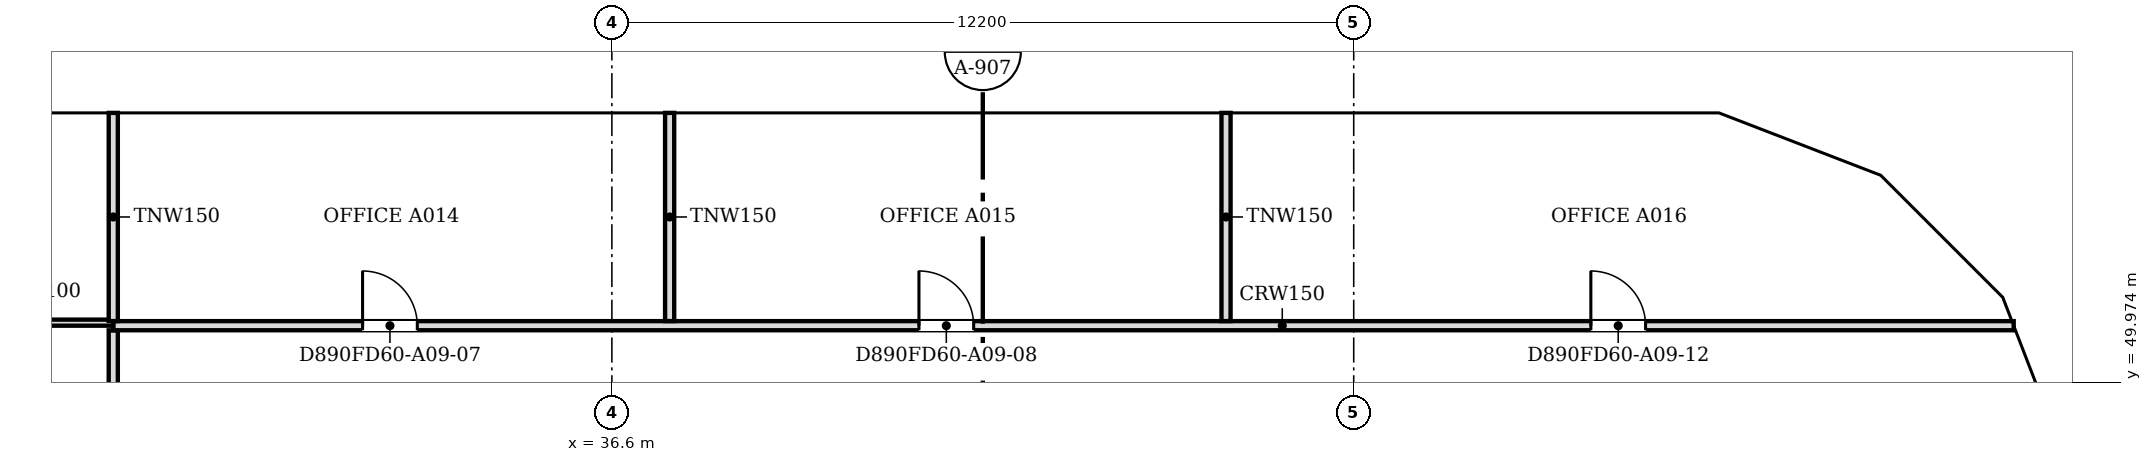
"""IFC4 building model, lengths in metres.
Left out: names, types, materials, properties, quantities, classifications, styles, units other than length and angle.
Written with IfcOpenShell. Run it as: python <this file> out.ifc"""

import sys

from ifc_helpers import new_model, si_unit, direction, frame, frame_2d, origin, place, context, subcontext, project, spatial, polyline, rectangle, outline, extrude, faceted_brep, source, transform, mapped, element, fill, save


model = new_model("IFC4")
c1 = context("Model", 3, precision=1e-05, world=origin(), true_north=direction((0.0, 1.0)))
c2 = subcontext(c1, "Body", "Model", "MODEL_VIEW")
j1 = project(units=[si_unit("LENGTHUNIT", "METRE"), si_unit("PLANEANGLEUNIT", "RADIAN")], contexts=[c1])
p1 = place(None, origin())
s1 = spatial("IfcSite", under=j1, at=p1, CompositionType="ELEMENT")
p2 = place(p1, origin())
s2 = spatial("IfcBuilding", under=s1, at=p2, CompositionType="ELEMENT")
p3 = place(p2, frame((0.0, 0.0, 99.0)))
s3 = spatial("IfcBuildingStorey", under=s2, at=p3, CompositionType="ELEMENT", Elevation=99.0)
m1 = source(origin(), c2, "Body", "Brep", [
    faceted_brep([(2.95, -0.25, 0.0), (3.003, -0.25, 0.068), (3.003, -0.25, 7.532), (2.95, -0.25, 7.6), (0.0, -0.25, 3.8), (0.047, 0.25, 3.86), (2.898, 0.25, 7.532), (2.898, 0.25, 0.068), (0.047, 0.25, 3.74), (2.95, 0.0, 0.0), (2.95, 0.0, 7.6), (0.0, 0.0, 3.8)], [[[0, 1, 2, 3, 4]], [[5, 6, 7, 8]], [[1, 0, 9]], [[10, 3, 2]], [[6, 5, 11, 4, 3, 10]], [[8, 7, 9, 0, 4, 11]], [[8, 11, 5]], [[1, 9, 7, 6, 10, 2]]]),
])
p4 = place(p3, frame((60.75, 48.753, -3.8), z_axis=(0.0, 0.0, 1.0), x_axis=(-0.35992665181, 0.932980602862, 0.0)))
e1 = element("IfcWall", 1, at=p4, inside=s3, PredefinedType="SOLIDWALL", context=c2, shape_type="MappedRepresentation", body=[
    mapped(m1, transform((0.0, 0.0, 0.0), scale=1.0)),
])
m2 = source(origin(), c2, "Body", "SweptSolid", [
    extrude(outline(polyline([(2.75, 6.935), (0.316, 3.8), (2.75, 0.665), (2.75, 6.935)])), frame((0.0, 0.26, 0.0), z_axis=(0.0, -1.0, 0.0), x_axis=(1.0, 0.0, 0.0)), (0.0, 0.0, 1.0), 0.52),
])
p5 = place(p4, origin())
e2 = element("IfcOpeningElement", 2, at=p5, cuts=e1, PredefinedType="OPENING", context=c2, shape_type="MappedRepresentation", body=[
    mapped(m2, transform((0.0, 0.0, 0.0), scale=1.0)),
])
m3 = source(origin(), c2, "Body", "Brep", [
    faceted_brep([(0.053, -0.25, 0.0), (2.997, -0.25, 3.8), (0.053, -0.25, 7.6), (0.0, -0.25, 7.532), (0.0, -0.25, 0.068), (0.106, 0.25, 7.532), (2.944, 0.25, 3.868), (2.944, 0.25, 3.732), (0.106, 0.25, 0.068), (2.997, 0.0, 3.8), (0.053, 0.0, 0.0), (0.053, 0.0, 7.6)], [[[0, 1, 2, 3, 4]], [[5, 6, 7, 8]], [[8, 7, 9, 1, 0, 10]], [[6, 5, 11, 2, 1, 9]], [[3, 2, 11]], [[10, 0, 4]], [[8, 10, 4, 3, 11, 5]], [[9, 7, 6]]]),
])
p6 = place(p3, frame((59.726, 51.469, -3.8), z_axis=(0.0, 0.0, 1.0), x_axis=(-0.707106781187, 0.707106781187, 0.0)))
e3 = element("IfcWall", 3, at=p6, inside=s3, PredefinedType="SOLIDWALL", context=c2, shape_type="MappedRepresentation", body=[
    mapped(m3, transform((0.0, 0.0, 0.0), scale=1.0)),
])
m4 = source(origin(), c2, "Body", "SweptSolid", [
    extrude(outline(polyline([(0.253, 0.666), (2.681, 3.8), (0.253, 6.934), (0.253, 0.666)])), frame((0.0, 0.26, 0.0), z_axis=(0.0, -1.0, 0.0), x_axis=(1.0, 0.0, 0.0)), (0.0, 0.0, 1.0), 0.52),
])
p7 = place(p6, origin())
e4 = element("IfcOpeningElement", 4, at=p7, cuts=e3, PredefinedType="OPENING", context=c2, shape_type="MappedRepresentation", body=[
    mapped(m4, transform((0.0, 0.0, 0.0), scale=1.0)),
])
m5 = source(origin(), c2, "Body", "Brep", [
    faceted_brep([(2.95, -0.25, 0.0), (2.997, -0.25, 0.059), (2.997, -0.25, 7.541), (2.95, -0.25, 7.6), (0.0, -0.25, 3.8), (0.053, 0.25, 3.868), (2.904, 0.25, 7.54), (2.904, 0.25, 0.06), (0.053, 0.25, 3.732), (2.95, 0.0, 0.0), (2.95, 0.0, 7.6), (0.0, 0.0, 3.8)], [[[0, 1, 2, 3, 4]], [[5, 6, 7, 8]], [[1, 0, 9]], [[10, 3, 2]], [[6, 5, 11, 4, 3, 10]], [[8, 7, 9, 0, 4, 11]], [[8, 11, 5]], [[1, 9, 7, 6, 10, 2]]]),
])
p8 = place(p3, frame((57.606, 53.588, -3.8), z_axis=(0.0, 0.0, 1.0), x_axis=(-0.932990326376, 0.359901446078, 0.0)))
e5 = element("IfcWall", 5, at=p8, inside=s3, PredefinedType="SOLIDWALL", context=c2, shape_type="MappedRepresentation", body=[
    mapped(m5, transform((0.0, 0.0, 0.0), scale=1.0)),
])
p9 = place(p8, origin())
e6 = element("IfcOpeningElement", 6, at=p9, cuts=e5, PredefinedType="OPENING", context=c2, shape_type="MappedRepresentation", body=[
    mapped(m2, transform((0.0, 0.0, 0.0), scale=1.0)),
])
m6 = source(origin(), c2, "Body", "Brep", [
    faceted_brep([(0.047, -0.25, 0.0), (3.05, -0.25, 3.8), (0.047, -0.25, 7.6), (0.0, -0.25, 7.54), (0.0, -0.25, 0.06), (0.093, 0.25, 7.541), (3.05, 0.25, 3.8), (0.093, 0.25, 0.059), (0.047, 0.0, 0.0), (0.047, 0.0, 7.6)], [[[0, 1, 2, 3, 4]], [[5, 6, 7]], [[7, 6, 1, 0, 8]], [[6, 5, 9, 2, 1]], [[3, 2, 9]], [[8, 0, 4]], [[7, 8, 4, 3, 9, 5]]]),
])
p10 = place(p3, frame((54.9, 54.65, -3.8), z_axis=(0.0, 0.0, 1.0), x_axis=(-1.0, 0.0, 0.0)))
e7 = element("IfcWall", 7, at=p10, inside=s3, PredefinedType="SOLIDWALL", context=c2, shape_type="MappedRepresentation", body=[
    mapped(m6, transform((0.0, 0.0, 0.0), scale=1.0)),
])
m7 = source(origin(), c2, "Body", "SweptSolid", [
    extrude(outline(polyline([(0.247, 0.656), (2.731, 3.8), (0.247, 6.944), (0.247, 0.656)])), frame((0.0, 0.26, 0.0), z_axis=(0.0, -1.0, 0.0), x_axis=(1.0, 0.0, 0.0)), (0.0, 0.0, 1.0), 0.52),
])
p11 = place(p10, origin())
e8 = element("IfcOpeningElement", 8, at=p11, cuts=e7, PredefinedType="OPENING", context=c2, shape_type="MappedRepresentation", body=[
    mapped(m7, transform((0.0, 0.0, 0.0), scale=1.0)),
])
m8 = source(origin(), c2, "Body", "SweptSolid", [
    extrude(outline(polyline([(3.05, 0.0), (6.1, 3.8), (3.05, 7.6), (0.0, 3.8), (3.05, 0.0)])), frame((0.0, 0.25, 0.0), z_axis=(0.0, -1.0, 0.0), x_axis=(1.0, 0.0, 0.0)), (0.0, 0.0, 1.0), 0.5),
])
p12 = place(p3, frame((51.85, 54.65, -3.8), z_axis=(0.0, 0.0, 1.0), x_axis=(-1.0, 0.0, 0.0)))
e9 = element("IfcWall", 9, at=p12, inside=s3, PredefinedType="SOLIDWALL", context=c2, shape_type="MappedRepresentation", body=[
    mapped(m8, transform((0.0, 0.0, 0.0), scale=1.0)),
])
m9 = source(origin(), c2, "Body", "SweptSolid", [
    extrude(outline(polyline([(3.05, 0.399), (5.78, 3.8), (3.05, 7.201), (0.321, 3.8), (3.05, 0.399)])), frame((0.0, 0.26, 0.0), z_axis=(0.0, -1.0, 0.0), x_axis=(1.0, 0.0, 0.0)), (0.0, 0.0, 1.0), 0.52),
])
p13 = place(p12, origin())
e10 = element("IfcOpeningElement", 10, at=p13, cuts=e9, PredefinedType="OPENING", context=c2, shape_type="MappedRepresentation", body=[
    mapped(m9, transform((0.0, 0.0, 0.0), scale=1.0)),
])
p14 = place(p3, frame((45.75, 54.65, -3.8), z_axis=(0.0, 0.0, 1.0), x_axis=(-1.0, 0.0, 0.0)))
e11 = element("IfcWall", 11, at=p14, inside=s3, PredefinedType="SOLIDWALL", context=c2, shape_type="MappedRepresentation", body=[
    mapped(m8, transform((0.0, 0.0, 0.0), scale=1.0)),
])
p15 = place(p14, origin())
e12 = element("IfcOpeningElement", 12, at=p15, cuts=e11, PredefinedType="OPENING", context=c2, shape_type="MappedRepresentation", body=[
    mapped(m9, transform((0.0, 0.0, 0.0), scale=1.0)),
])
m10 = source(origin(), c2, "Body", "Brep", [
    faceted_brep([(3.05, -0.25, 0.0), (6.1, -0.25, 3.8), (6.1, -0.25, 3.8), (3.05, -0.25, 7.6), (0.0, -0.25, 3.8), (0.0, 0.25, 3.8), (3.05, 0.25, 7.6), (6.1, 0.25, 3.8), (6.1, 0.25, 3.8), (3.05, 0.25, 0.0)], [[[0, 1, 2, 3, 4]], [[5, 6, 7, 8, 9]], [[9, 8, 1, 0]], [[7, 6, 3, 2]], [[6, 5, 4, 3]], [[5, 9, 0, 4]], [[1, 8, 7, 2]]]),
])
p16 = place(p3, frame((39.65, 54.65, -3.8), z_axis=(0.0, 0.0, 1.0), x_axis=(-1.0, 0.0, 0.0)))
e13 = element("IfcWall", 13, at=p16, inside=s3, PredefinedType="SOLIDWALL", context=c2, shape_type="MappedRepresentation", body=[
    mapped(m10, transform((0.0, 0.0, 0.0), scale=1.0)),
])
p17 = place(p16, origin())
e14 = element("IfcOpeningElement", 14, at=p17, cuts=e13, PredefinedType="OPENING", context=c2, shape_type="MappedRepresentation", body=[
    mapped(m9, transform((0.0, 0.0, 0.0), scale=1.0)),
])
p18 = place(p3, frame((33.55, 54.65, -3.8), z_axis=(0.0, 0.0, 1.0), x_axis=(-1.0, 0.0, 0.0)))
e15 = element("IfcWall", 15, at=p18, inside=s3, PredefinedType="SOLIDWALL", context=c2, shape_type="MappedRepresentation", body=[
    mapped(m8, transform((0.0, 0.0, 0.0), scale=1.0)),
])
p19 = place(p18, origin())
e16 = element("IfcOpeningElement", 16, at=p19, cuts=e15, PredefinedType="OPENING", context=c2, shape_type="MappedRepresentation", body=[
    mapped(m9, transform((0.0, 0.0, 0.0), scale=1.0)),
])
p20 = place(p3, frame((27.45, 54.65, -3.8), z_axis=(0.0, 0.0, 1.0), x_axis=(-1.0, 0.0, 0.0)))
e17 = element("IfcWall", 17, at=p20, inside=s3, PredefinedType="SOLIDWALL", context=c2, shape_type="MappedRepresentation", body=[
    mapped(m10, transform((0.0, 0.0, 0.0), scale=1.0)),
])
p21 = place(p20, origin())
e18 = element("IfcOpeningElement", 18, at=p21, cuts=e17, PredefinedType="OPENING", context=c2, shape_type="MappedRepresentation", body=[
    mapped(m9, transform((0.0, 0.0, 0.0), scale=1.0)),
])
p22 = place(p2, frame((0.0, 0.0, 102.8)))
s4 = spatial("IfcBuildingStorey", under=s2, at=p22, CompositionType="ELEMENT", Elevation=102.8)
m11 = source(origin(), c2, "Body", "Brep", [
    faceted_brep([(0.047, -0.25, 0.0), (2.997, -0.25, 3.8), (0.047, -0.25, 7.6), (0.0, -0.25, 7.541), (0.0, -0.25, 0.059), (0.093, 0.25, 7.54), (2.944, 0.25, 3.868), (2.944, 0.25, 3.732), (0.093, 0.25, 0.06), (2.997, 0.0, 3.8), (0.047, 0.0, 0.0), (0.047, 0.0, 7.6)], [[[0, 1, 2, 3, 4]], [[5, 6, 7, 8]], [[8, 7, 9, 1, 0, 10]], [[6, 5, 11, 2, 1, 9]], [[3, 2, 11]], [[10, 0, 4]], [[8, 10, 4, 3, 11, 5]], [[9, 7, 6]]]),
])
p23 = place(p22, frame((60.767, 48.71, -3.8), z_axis=(0.0, 0.0, 1.0), x_axis=(-0.359901446078, 0.932990326376, 0.0)))
e19 = element("IfcWall", 19, at=p23, inside=s4, PredefinedType="SOLIDWALL", context=c2, shape_type="MappedRepresentation", body=[
    mapped(m11, transform((0.0, 0.0, 0.0), scale=1.0)),
])
m12 = source(origin(), c2, "Body", "SweptSolid", [
    extrude(outline(polyline([(0.247, 0.665), (2.681, 3.8), (0.247, 6.935), (0.247, 0.665)])), frame((0.0, 0.26, 0.0), z_axis=(0.0, -1.0, 0.0), x_axis=(1.0, 0.0, 0.0)), (0.0, 0.0, 1.0), 0.52),
])
p24 = place(p23, origin())
e20 = element("IfcOpeningElement", 20, at=p24, cuts=e19, PredefinedType="OPENING", context=c2, shape_type="MappedRepresentation", body=[
    mapped(m12, transform((0.0, 0.0, 0.0), scale=1.0)),
])
m13 = source(origin(), c2, "Body", "Brep", [
    faceted_brep([(2.944, -0.25, 0.0), (2.997, -0.25, 0.068), (2.997, -0.25, 7.532), (2.944, -0.25, 7.6), (0.0, -0.25, 3.8), (0.053, 0.25, 3.868), (2.891, 0.25, 7.532), (2.891, 0.25, 0.068), (0.053, 0.25, 3.732), (2.944, 0.0, 0.0), (2.944, 0.0, 7.6), (0.0, 0.0, 3.8)], [[[0, 1, 2, 3, 4]], [[5, 6, 7, 8]], [[1, 0, 9]], [[10, 3, 2]], [[6, 5, 11, 4, 3, 10]], [[8, 7, 9, 0, 4, 11]], [[8, 11, 5]], [[1, 9, 7, 6, 10, 2]]]),
])
p25 = place(p22, frame((59.688, 51.506, -3.8), z_axis=(0.0, 0.0, 1.0), x_axis=(-0.707106781187, 0.707106781187, 0.0)))
e21 = element("IfcWall", 21, at=p25, inside=s4, PredefinedType="SOLIDWALL", context=c2, shape_type="MappedRepresentation", body=[
    mapped(m13, transform((0.0, 0.0, 0.0), scale=1.0)),
])
m14 = source(origin(), c2, "Body", "SweptSolid", [
    extrude(outline(polyline([(2.744, 6.934), (0.316, 3.8), (2.744, 0.666), (2.744, 6.934)])), frame((0.0, 0.26, 0.0), z_axis=(0.0, -1.0, 0.0), x_axis=(1.0, 0.0, 0.0)), (0.0, 0.0, 1.0), 0.52),
])
p26 = place(p25, origin())
e22 = element("IfcOpeningElement", 22, at=p26, cuts=e21, PredefinedType="OPENING", context=c2, shape_type="MappedRepresentation", body=[
    mapped(m14, transform((0.0, 0.0, 0.0), scale=1.0)),
])
m15 = source(origin(), c2, "Body", "Brep", [
    faceted_brep([(0.053, -0.25, 0.0), (3.003, -0.25, 3.8), (0.053, -0.25, 7.6), (0.0, -0.25, 7.532), (0.0, -0.25, 0.068), (0.106, 0.25, 7.532), (2.957, 0.25, 3.86), (2.957, 0.25, 3.74), (0.106, 0.25, 0.068), (3.003, 0.0, 3.8), (0.053, 0.0, 0.0), (0.053, 0.0, 7.6)], [[[0, 1, 2, 3, 4]], [[5, 6, 7, 8]], [[8, 7, 9, 1, 0, 10]], [[6, 5, 11, 2, 1, 9]], [[3, 2, 11]], [[10, 0, 4]], [[8, 10, 4, 3, 11, 5]], [[9, 7, 6]]]),
])
p27 = place(p22, frame((57.656, 53.569, -3.8), z_axis=(0.0, 0.0, 1.0), x_axis=(-0.933007896601, 0.359855894603, 0.0)))
e23 = element("IfcWall", 23, at=p27, inside=s4, PredefinedType="SOLIDWALL", context=c2, shape_type="MappedRepresentation", body=[
    mapped(m15, transform((0.0, 0.0, 0.0), scale=1.0)),
])
m16 = source(origin(), c2, "Body", "SweptSolid", [
    extrude(outline(polyline([(0.253, 0.665), (2.687, 3.8), (0.253, 6.935), (0.253, 0.665)])), frame((0.0, 0.26, 0.0), z_axis=(0.0, -1.0, 0.0), x_axis=(1.0, 0.0, 0.0)), (0.0, 0.0, 1.0), 0.52),
])
p28 = place(p27, origin())
e24 = element("IfcOpeningElement", 24, at=p28, cuts=e23, PredefinedType="OPENING", context=c2, shape_type="MappedRepresentation", body=[
    mapped(m16, transform((0.0, 0.0, 0.0), scale=1.0)),
])
m17 = source(origin(), c2, "Body", "Brep", [
    faceted_brep([(3.003, -0.25, 0.0), (6.053, -0.25, 3.8), (3.003, -0.25, 7.6), (0.0, -0.25, 3.8), (0.047, 0.25, 3.859), (3.003, 0.25, 7.6), (6.053, 0.25, 3.8), (3.003, 0.25, 0.0), (0.047, 0.25, 3.741), (0.0, 0.0, 3.8)], [[[0, 1, 2, 3]], [[4, 5, 6, 7, 8]], [[7, 6, 1, 0]], [[6, 5, 2, 1]], [[5, 4, 9, 3, 2]], [[8, 7, 0, 3, 9]], [[8, 9, 4]]]),
])
p29 = place(p22, frame((54.854, 54.65, -3.8), z_axis=(0.0, 0.0, 1.0), x_axis=(-1.0, 0.0, 0.0)))
e25 = element("IfcWall", 25, at=p29, inside=s4, PredefinedType="SOLIDWALL", context=c2, shape_type="MappedRepresentation", body=[
    mapped(m17, transform((0.0, 0.0, 0.0), scale=1.0)),
])
m18 = source(origin(), c2, "Body", "SweptSolid", [
    extrude(outline(polyline([(3.005, 0.401), (5.733, 3.8), (3.005, 7.199), (0.319, 3.8), (3.005, 0.401)])), frame((0.0, 0.26, 0.0), z_axis=(0.0, -1.0, 0.0), x_axis=(1.0, 0.0, 0.0)), (0.0, 0.0, 1.0), 0.52),
])
p30 = place(p29, origin())
e26 = element("IfcOpeningElement", 26, at=p30, cuts=e25, PredefinedType="OPENING", context=c2, shape_type="MappedRepresentation", body=[
    mapped(m18, transform((0.0, 0.0, 0.0), scale=1.0)),
])
p31 = place(p22, frame((48.8, 54.65, -3.8), z_axis=(0.0, 0.0, 1.0), x_axis=(-1.0, 0.0, 0.0)))
e27 = element("IfcWall", 27, at=p31, inside=s4, PredefinedType="SOLIDWALL", context=c2, shape_type="MappedRepresentation", body=[
    mapped(m8, transform((0.0, 0.0, 0.0), scale=1.0)),
])
p32 = place(p31, origin())
e28 = element("IfcOpeningElement", 28, at=p32, cuts=e27, PredefinedType="OPENING", context=c2, shape_type="MappedRepresentation", body=[
    mapped(m9, transform((0.0, 0.0, 0.0), scale=1.0)),
])
p33 = place(p22, frame((42.7, 54.65, -3.8), z_axis=(0.0, 0.0, 1.0), x_axis=(-1.0, 0.0, 0.0)))
e29 = element("IfcWall", 29, at=p33, inside=s4, PredefinedType="SOLIDWALL", context=c2, shape_type="MappedRepresentation", body=[
    mapped(m10, transform((0.0, 0.0, 0.0), scale=1.0)),
])
p34 = place(p33, origin())
e30 = element("IfcOpeningElement", 30, at=p34, cuts=e29, PredefinedType="OPENING", context=c2, shape_type="MappedRepresentation", body=[
    mapped(m9, transform((0.0, 0.0, 0.0), scale=1.0)),
])
p35 = place(p22, frame((36.6, 54.65, -3.8), z_axis=(0.0, 0.0, 1.0), x_axis=(-1.0, 0.0, 0.0)))
e31 = element("IfcWall", 31, at=p35, inside=s4, PredefinedType="SOLIDWALL", context=c2, shape_type="MappedRepresentation", body=[
    mapped(m8, transform((0.0, 0.0, 0.0), scale=1.0)),
])
p36 = place(p35, origin())
e32 = element("IfcOpeningElement", 32, at=p36, cuts=e31, PredefinedType="OPENING", context=c2, shape_type="MappedRepresentation", body=[
    mapped(m9, transform((0.0, 0.0, 0.0), scale=1.0)),
])
p37 = place(p22, frame((30.5, 54.65, -3.8), z_axis=(0.0, 0.0, 1.0), x_axis=(-1.0, 0.0, 0.0)))
e33 = element("IfcWall", 33, at=p37, inside=s4, PredefinedType="SOLIDWALL", context=c2, shape_type="MappedRepresentation", body=[
    mapped(m8, transform((0.0, 0.0, 0.0), scale=1.0)),
])
p38 = place(p37, origin())
e34 = element("IfcOpeningElement", 34, at=p38, cuts=e33, PredefinedType="OPENING", context=c2, shape_type="MappedRepresentation", body=[
    mapped(m9, transform((0.0, 0.0, 0.0), scale=1.0)),
])
p39 = place(p3, frame((28.4, 48.176, 0.0), z_axis=(0.0, 0.0, 1.0), x_axis=(0.0, 1.0, 0.0)))
e35 = element("IfcWall", 35, at=p39, inside=s3, PredefinedType="PARTITIONING", context=c2, shape_type="SweptSolid", body=[
    extrude(rectangle(XDim=2.648, YDim=0.15, at=frame_2d((1.324, 0.0))), origin(), (0.0, 0.0, 1.0), 3.067),
])
p40 = place(p3, frame((28.4, 50.9, 0.0), z_axis=(0.0, 0.0, 1.0), x_axis=(1.0, 0.0, 0.0)))
e36 = element("IfcWall", 36, at=p40, inside=s3, PredefinedType="PARTITIONING", context=c2, shape_type="SweptSolid", body=[
    extrude(rectangle(XDim=31.254, YDim=0.15, at=frame_2d((15.627, 0.0))), origin(), (0.0, 0.0, 1.0), 3.067),
])
m19 = source(origin(), c2, "Body", "SweptSolid", [
    extrude(rectangle(XDim=0.9, YDim=2.1, at=frame_2d((0.45, 1.05))), frame((0.0, 0.085, 0.0), z_axis=(0.0, -1.0, 0.0), x_axis=(1.0, 0.0, 0.0)), (0.0, 0.0, 1.0), 0.17),
])
p41 = place(p40, frame((4.1, 0.0, 0.0)))
e37 = element("IfcOpeningElement", 37, at=p41, cuts=e36, PredefinedType="OPENING", context=c2, shape_type="MappedRepresentation", body=[
    mapped(m19, transform((0.0, 0.0, 0.0), scale=1.0)),
])
p42 = place(p40, frame((13.25, 0.0, 0.0)))
e38 = element("IfcOpeningElement", 38, at=p42, cuts=e36, PredefinedType="OPENING", context=c2, shape_type="MappedRepresentation", body=[
    mapped(m19, transform((0.0, 0.0, 0.0), scale=1.0)),
])
p43 = place(p40, frame((24.3, 0.0, 0.0)))
e39 = element("IfcOpeningElement", 39, at=p43, cuts=e36, PredefinedType="OPENING", context=c2, shape_type="MappedRepresentation", body=[
    mapped(m19, transform((0.0, 0.0, 0.0), scale=1.0)),
])
p44 = place(p3, frame((22.826, 50.95, 0.0), z_axis=(0.0, 0.0, 1.0), x_axis=(1.0, 0.0, 0.0)))
e40 = element("IfcWall", 40, at=p44, inside=s3, PredefinedType="PARTITIONING", context=c2, shape_type="SweptSolid", body=[
    extrude(rectangle(XDim=5.573, YDim=0.1, at=frame_2d((2.787, 0.0))), origin(), (0.0, 0.0, 1.0), 3.067),
])
m20 = source(origin(), c2, "Body", "SweptSolid", [
    extrude(rectangle(XDim=0.9, YDim=2.1, at=frame_2d((0.45, 1.05))), frame((0.0, 0.06, 0.0), z_axis=(0.0, -1.0, 0.0), x_axis=(1.0, 0.0, 0.0)), (0.0, 0.0, 1.0), 0.12),
])
p45 = place(p44, frame((2.3, 0.0, 0.0)))
e41 = element("IfcOpeningElement", 41, at=p45, cuts=e40, PredefinedType="OPENING", context=c2, shape_type="MappedRepresentation", body=[
    mapped(m20, transform((0.0, 0.0, 0.0), scale=1.0)),
])
for number, where, z_axis, x_axis in (
    (42, (28.4, 50.976, 0.0), (0.0, 0.0, 1.0), (0.0, 1.0, 0.0)),
    (43, (37.55, 50.976, 0.0), (0.0, 0.0, 1.0), (0.0, 1.0, 0.0)),
    (44, (46.7, 50.976, 0.0), (0.0, 0.0, 1.0), (0.0, 1.0, 0.0)),
):
    element("IfcWall", number, at=place(p3, frame(where, z_axis=z_axis, x_axis=x_axis)), inside=s3, PredefinedType="PARTITIONING", context=c2, shape_type="SweptSolid", body=[
        extrude(rectangle(XDim=3.424, YDim=0.15, at=frame_2d((1.712, 0.0))), origin(), (0.0, 0.0, 1.0), 3.067),
    ])
m21 = source(origin(), c2, "Body", "SweptSolid", [
    extrude(rectangle(XDim=0.9, YDim=2.1, at=frame_2d((0.45, 1.05))), frame((0.0, 0.025, 0.0), z_axis=(0.0, -1.0, 0.0), x_axis=(1.0, 0.0, 0.0)), (0.0, 0.0, 1.0), 0.05),
])
p46 = place(p41, origin())
e45 = element("IfcDoor", 45, at=p46, inside=s3, OperationType="SINGLE_SWING_LEFT", PredefinedType="DOOR", context=c2, shape_type="MappedRepresentation", body=[
    mapped(m21, transform((0.0, 0.0, 0.0), scale=1.0)),
])
fill(e37, e45)
p47 = place(p42, origin())
e46 = element("IfcDoor", 46, at=p47, inside=s3, OperationType="SINGLE_SWING_LEFT", PredefinedType="DOOR", context=c2, shape_type="MappedRepresentation", body=[
    mapped(m21, transform((0.0, 0.0, 0.0), scale=1.0)),
])
fill(e38, e46)
p48 = place(p43, origin())
e47 = element("IfcDoor", 47, at=p48, inside=s3, OperationType="SINGLE_SWING_LEFT", PredefinedType="DOOR", context=c2, shape_type="MappedRepresentation", body=[
    mapped(m21, transform((0.0, 0.0, 0.0), scale=1.0)),
])
fill(e39, e47)
save(model, sys.argv[1])
